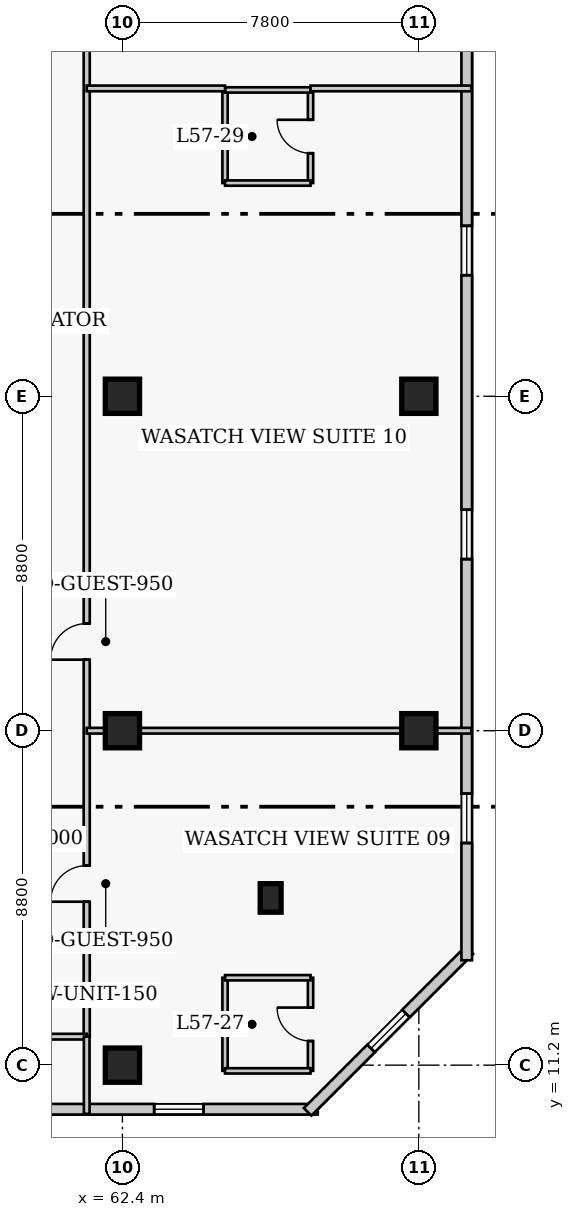
"""IFC4 building model, lengths in metres.
Left out: names, types, materials, properties, quantities, classifications, styles, units other than length and angle.
Written with IfcOpenShell. Run it as: python <this file> out.ifc"""

import sys

from ifc_helpers import new_model, si_unit, direction, frame, frame_2d, origin, origin_2d, place, context, subcontext, project, spatial, rectangle, extrude, element, fill, save


model = new_model("IFC4")
c1 = context("Model", 3, precision=1e-05, world=origin(), true_north=direction((0.0, 1.0)))
c2 = subcontext(c1, "Body", "Model", "MODEL_VIEW")
j1 = project(units=[si_unit("LENGTHUNIT", "METRE"), si_unit("PLANEANGLEUNIT", "RADIAN")], contexts=[c1])
p1 = place(None, origin())
s1 = spatial("IfcSite", under=j1, at=p1, CompositionType="ELEMENT")
p2 = place(p1, origin())
s2 = spatial("IfcBuilding", under=s1, at=p2, CompositionType="ELEMENT")
p3 = place(p2, frame((0.0, 0.0, 228.0)))
s3 = spatial("IfcBuildingStorey", under=s2, at=p3, CompositionType="ELEMENT", Elevation=228.0)
for number, where, z_axis, x_axis in (
    (1, (62.4, 11.2, 0.0), (0.0, 0.0, 1.0), (1.0, 0.0, 0.0)),
    (2, (62.4, 20.0, 0.0), (0.0, 0.0, 1.0), (1.0, 0.0, 0.0)),
    (3, (62.4, 28.8, 0.0), (0.0, 0.0, 1.0), (1.0, 0.0, 0.0)),
    (4, (70.2, 20.0, 0.0), (0.0, 0.0, 1.0), (1.0, 0.0, 0.0)),
    (5, (70.2, 28.8, 0.0), (0.0, 0.0, 1.0), (1.0, 0.0, 0.0)),
):
    element("IfcColumn", number, at=place(p3, frame(where, z_axis=z_axis, x_axis=x_axis)), inside=s3, PredefinedType="COLUMN", context=c2, shape_type="SweptSolid", body=[
        extrude(rectangle(XDim=0.9, YDim=0.9, at=origin_2d()), origin(), (0.0, 0.0, 1.0), 3.9),
    ])
p4 = place(p3, frame((66.3, 15.6, 0.0), z_axis=(0.0, 0.0, 1.0), x_axis=(1.0, 0.0, 0.0)))
e6 = element("IfcColumn", 6, at=p4, inside=s3, PredefinedType="PILASTER", context=c2, shape_type="SweptSolid", body=[
    extrude(rectangle(XDim=0.55, YDim=0.75, at=origin_2d()), origin(), (0.0, 0.0, 1.0), 3.9),
])
p5 = place(p3, frame((41.71, 10.04, 0.0), z_axis=(0.0, 0.0, 1.0), x_axis=(1.0, 0.0, 0.0)))
e7 = element("IfcWall", 7, at=p5, inside=s3, PredefinedType="SOLIDWALL", context=c2, shape_type="SweptSolid", body=[
    extrude(rectangle(XDim=25.83, YDim=0.28, at=frame_2d((12.915, 0.0))), origin(), (0.0, 0.0, 1.0), 3.56),
])
p6 = place(p5, frame((8.29, 0.0, 0.0)))
e8 = element("IfcOpeningElement", 8, at=p6, cuts=e7, PredefinedType="OPENING", context=c2, shape_type="SweptSolid", body=[
    extrude(rectangle(XDim=1.4, YDim=2.15, at=frame_2d((0.7, 1.075))), frame((0.0, 0.15, 0.0), z_axis=(0.0, -1.0, 0.0), x_axis=(1.0, 0.0, 0.0)), (0.0, 0.0, 1.0), 0.3),
])
p7 = place(p5, frame((3.005, 0.0, 0.85)))
e9 = element("IfcOpeningElement", 9, at=p7, cuts=e7, PredefinedType="OPENING", context=c2, shape_type="SweptSolid", body=[
    extrude(rectangle(XDim=1.3, YDim=1.7, at=frame_2d((0.65, 0.85))), frame((0.0, 0.15, 0.0), z_axis=(0.0, -1.0, 0.0), x_axis=(1.0, 0.0, 0.0)), (0.0, 0.0, 1.0), 0.3),
])
p8 = place(p5, frame((13.415, 0.0, 0.85)))
e10 = element("IfcOpeningElement", 10, at=p8, cuts=e7, PredefinedType="OPENING", context=c2, shape_type="SweptSolid", body=[
    extrude(rectangle(XDim=1.3, YDim=1.7, at=frame_2d((0.65, 0.85))), frame((0.0, 0.15, 0.0), z_axis=(0.0, -1.0, 0.0), x_axis=(1.0, 0.0, 0.0)), (0.0, 0.0, 1.0), 0.3),
])
p9 = place(p5, frame((21.525, 0.0, 0.85)))
e11 = element("IfcOpeningElement", 11, at=p9, cuts=e7, PredefinedType="OPENING", context=c2, shape_type="SweptSolid", body=[
    extrude(rectangle(XDim=1.3, YDim=1.7, at=frame_2d((0.65, 0.85))), frame((0.0, 0.15, 0.0), z_axis=(0.0, -1.0, 0.0), x_axis=(1.0, 0.0, 0.0)), (0.0, 0.0, 1.0), 0.3),
])
p10 = place(p3, frame((67.273, 9.971, 0.0), z_axis=(0.0, 0.0, 1.0), x_axis=(0.707106781187, 0.707106781187, 0.0)))
e12 = element("IfcWall", 12, at=p10, inside=s3, PredefinedType="SOLIDWALL", context=c2, shape_type="SweptSolid", body=[
    extrude(rectangle(XDim=6.02, YDim=0.28, at=frame_2d((3.01, 0.0))), origin(), (0.0, 0.0, 1.0), 3.56),
])
p11 = place(p10, frame((2.36, 0.0, 0.85)))
e13 = element("IfcOpeningElement", 13, at=p11, cuts=e12, PredefinedType="OPENING", context=c2, shape_type="SweptSolid", body=[
    extrude(rectangle(XDim=1.3, YDim=1.7, at=frame_2d((0.65, 0.85))), frame((0.0, 0.15, 0.0), z_axis=(0.0, -1.0, 0.0), x_axis=(1.0, 0.0, 0.0)), (0.0, 0.0, 1.0), 0.3),
])
p12 = place(p3, frame((71.46, 13.96, 0.0), z_axis=(0.0, 0.0, 1.0), x_axis=(0.0, 1.0, 0.0)))
e14 = element("IfcWall", 14, at=p12, inside=s3, PredefinedType="SOLIDWALL", context=c2, shape_type="SweptSolid", body=[
    extrude(rectangle(XDim=29.88, YDim=0.28, at=frame_2d((14.94, 0.0))), origin(), (0.0, 0.0, 1.0), 3.56),
])
p13 = place(p12, frame((3.085, 0.0, 0.85)))
e15 = element("IfcOpeningElement", 15, at=p13, cuts=e14, PredefinedType="OPENING", context=c2, shape_type="SweptSolid", body=[
    extrude(rectangle(XDim=1.3, YDim=1.7, at=frame_2d((0.65, 0.85))), frame((0.0, 0.15, 0.0), z_axis=(0.0, -1.0, 0.0), x_axis=(1.0, 0.0, 0.0)), (0.0, 0.0, 1.0), 0.3),
])
p14 = place(p12, frame((10.555, 0.0, 0.85)))
e16 = element("IfcOpeningElement", 16, at=p14, cuts=e14, PredefinedType="OPENING", context=c2, shape_type="SweptSolid", body=[
    extrude(rectangle(XDim=1.3, YDim=1.7, at=frame_2d((0.65, 0.85))), frame((0.0, 0.15, 0.0), z_axis=(0.0, -1.0, 0.0), x_axis=(1.0, 0.0, 0.0)), (0.0, 0.0, 1.0), 0.3),
])
p15 = place(p12, frame((18.025, 0.0, 0.85)))
e17 = element("IfcOpeningElement", 17, at=p15, cuts=e14, PredefinedType="OPENING", context=c2, shape_type="SweptSolid", body=[
    extrude(rectangle(XDim=1.3, YDim=1.7, at=frame_2d((0.65, 0.85))), frame((0.0, 0.15, 0.0), z_axis=(0.0, -1.0, 0.0), x_axis=(1.0, 0.0, 0.0)), (0.0, 0.0, 1.0), 0.3),
])
p16 = place(p12, frame((25.495, 0.0, 0.85)))
e18 = element("IfcOpeningElement", 18, at=p16, cuts=e14, PredefinedType="OPENING", context=c2, shape_type="SweptSolid", body=[
    extrude(rectangle(XDim=1.3, YDim=1.7, at=frame_2d((0.65, 0.85))), frame((0.0, 0.15, 0.0), z_axis=(0.0, -1.0, 0.0), x_axis=(1.0, 0.0, 0.0)), (0.0, 0.0, 1.0), 0.3),
])
p17 = place(p3, frame((61.46, 11.95, 0.0), z_axis=(0.0, 0.0, 1.0), x_axis=(0.0, 1.0, 0.0)))
e19 = element("IfcWall", 19, at=p17, inside=s3, PredefinedType="PARTITIONING", context=c2, shape_type="SweptSolid", body=[
    extrude(rectangle(XDim=28.7, YDim=0.16, at=frame_2d((14.35, 0.0))), origin(), (0.0, 0.0, 1.0), 3.56),
])
p18 = place(p17, frame((3.55, 0.0, 0.0)))
e20 = element("IfcOpeningElement", 20, at=p18, cuts=e19, PredefinedType="OPENING", context=c2, shape_type="SweptSolid", body=[
    extrude(rectangle(XDim=0.95, YDim=2.1, at=frame_2d((0.475, 1.05))), frame((0.0, 0.09, 0.0), z_axis=(0.0, -1.0, 0.0), x_axis=(1.0, 0.0, 0.0)), (0.0, 0.0, 1.0), 0.18),
])
p19 = place(p17, frame((9.919, 0.0, 0.0)))
e21 = element("IfcOpeningElement", 21, at=p19, cuts=e19, PredefinedType="OPENING", context=c2, shape_type="SweptSolid", body=[
    extrude(rectangle(XDim=0.95, YDim=2.1, at=frame_2d((0.475, 1.05))), frame((0.0, 0.09, 0.0), z_axis=(0.0, -1.0, 0.0), x_axis=(1.0, 0.0, 0.0)), (0.0, 0.0, 1.0), 0.18),
])
p20 = place(p17, frame((27.26, 0.0, 0.0)))
e22 = element("IfcOpeningElement", 22, at=p20, cuts=e19, PredefinedType="OPENING", context=c2, shape_type="SweptSolid", body=[
    extrude(rectangle(XDim=1.0, YDim=2.15, at=frame_2d((0.5, 1.075))), frame((0.0, 0.09, 0.0), z_axis=(0.0, -1.0, 0.0), x_axis=(1.0, 0.0, 0.0)), (0.0, 0.0, 1.0), 0.18),
])
p21 = place(p3, frame((59.24, 11.95, 0.0), z_axis=(0.0, 0.0, 1.0), x_axis=(1.0, 0.0, 0.0)))
e23 = element("IfcWall", 23, at=p21, inside=s3, PredefinedType="PARTITIONING", context=c2, shape_type="SweptSolid", body=[
    extrude(rectangle(XDim=2.22, YDim=0.15, at=frame_2d((1.11, 0.0))), origin(), (0.0, 0.0, 1.0), 3.56),
])
p22 = place(p3, frame((61.46, 9.92, 0.0), z_axis=(0.0, 0.0, 1.0), x_axis=(0.0, 1.0, 0.0)))
e24 = element("IfcWall", 24, at=p22, inside=s3, PredefinedType="PARTITIONING", context=c2, shape_type="SweptSolid", body=[
    extrude(rectangle(XDim=2.03, YDim=0.15, at=frame_2d((1.015, 0.0))), origin(), (0.0, 0.0, 1.0), 3.56),
])
p23 = place(p3, frame((65.1, 11.05, 0.0), z_axis=(0.0, 0.0, 1.0), x_axis=(0.0, 1.0, 0.0)))
e25 = element("IfcWall", 25, at=p23, inside=s3, PredefinedType="PLUMBINGWALL", context=c2, shape_type="SweptSolid", body=[
    extrude(rectangle(XDim=2.45, YDim=0.14, at=frame_2d((1.225, 0.0))), origin(), (0.0, 0.0, 1.0), 3.56),
])
p24 = place(p3, frame((67.35, 11.05, 0.0), z_axis=(0.0, 0.0, 1.0), x_axis=(0.0, 1.0, 0.0)))
e26 = element("IfcWall", 26, at=p24, inside=s3, PredefinedType="PLUMBINGWALL", context=c2, shape_type="SweptSolid", body=[
    extrude(rectangle(XDim=2.45, YDim=0.14, at=frame_2d((1.225, 0.0))), origin(), (0.0, 0.0, 1.0), 3.56),
])
p25 = place(p24, frame((0.785, 0.0, 0.0)))
e27 = element("IfcOpeningElement", 27, at=p25, cuts=e26, PredefinedType="OPENING", context=c2, shape_type="SweptSolid", body=[
    extrude(rectangle(XDim=0.88, YDim=2.05, at=frame_2d((0.44, 1.025))), frame((0.0, 0.08, 0.0), z_axis=(0.0, -1.0, 0.0), x_axis=(1.0, 0.0, 0.0)), (0.0, 0.0, 1.0), 0.16),
])
for number, where, z_axis, x_axis in (
    (28, (65.1, 11.05, 0.0), (0.0, 0.0, 1.0), (1.0, 0.0, 0.0)),
    (29, (65.1, 13.5, 0.0), (0.0, 0.0, 1.0), (1.0, 0.0, 0.0)),
):
    element("IfcWall", number, at=place(p3, frame(where, z_axis=z_axis, x_axis=x_axis)), inside=s3, PredefinedType="PLUMBINGWALL", context=c2, shape_type="SweptSolid", body=[
        extrude(rectangle(XDim=2.25, YDim=0.14, at=frame_2d((1.125, 0.0))), origin(), (0.0, 0.0, 1.0), 3.56),
    ])
p26 = place(p3, frame((61.46, 20.0, 0.0), z_axis=(0.0, 0.0, 1.0), x_axis=(1.0, 0.0, 0.0)))
e30 = element("IfcWall", 30, at=p26, inside=s3, PredefinedType="PARTITIONING", context=c2, shape_type="SweptSolid", body=[
    extrude(rectangle(XDim=10.12, YDim=0.15, at=frame_2d((5.06, 0.0))), origin(), (0.0, 0.0, 1.0), 2.788),
])
p27 = place(p3, frame((65.1, 34.41, 0.0), z_axis=(0.0, 0.0, 1.0), x_axis=(0.0, 1.0, 0.0)))
e31 = element("IfcWall", 31, at=p27, inside=s3, PredefinedType="PLUMBINGWALL", context=c2, shape_type="SweptSolid", body=[
    extrude(rectangle(XDim=2.45, YDim=0.14, at=frame_2d((1.225, 0.0))), origin(), (0.0, 0.0, 1.0), 3.56),
])
p28 = place(p3, frame((67.35, 34.41, 0.0), z_axis=(0.0, 0.0, 1.0), x_axis=(0.0, 1.0, 0.0)))
e32 = element("IfcWall", 32, at=p28, inside=s3, PredefinedType="PLUMBINGWALL", context=c2, shape_type="SweptSolid", body=[
    extrude(rectangle(XDim=2.45, YDim=0.14, at=frame_2d((1.225, 0.0))), origin(), (0.0, 0.0, 1.0), 3.56),
])
p29 = place(p28, frame((0.785, 0.0, 0.0)))
e33 = element("IfcOpeningElement", 33, at=p29, cuts=e32, PredefinedType="OPENING", context=c2, shape_type="SweptSolid", body=[
    extrude(rectangle(XDim=0.88, YDim=2.05, at=frame_2d((0.44, 1.025))), frame((0.0, 0.08, 0.0), z_axis=(0.0, -1.0, 0.0), x_axis=(1.0, 0.0, 0.0)), (0.0, 0.0, 1.0), 0.16),
])
for number, where, z_axis, x_axis in (
    (34, (65.1, 34.41, 0.0), (0.0, 0.0, 1.0), (1.0, 0.0, 0.0)),
    (35, (65.1, 36.86, 0.0), (0.0, 0.0, 1.0), (1.0, 0.0, 0.0)),
):
    element("IfcWall", number, at=place(p3, frame(where, z_axis=z_axis, x_axis=x_axis)), inside=s3, PredefinedType="PLUMBINGWALL", context=c2, shape_type="SweptSolid", body=[
        extrude(rectangle(XDim=2.25, YDim=0.14, at=frame_2d((1.125, 0.0))), origin(), (0.0, 0.0, 1.0), 3.56),
    ])
p30 = place(p3, frame((61.46, 36.9, 0.0), z_axis=(0.0, 0.0, 1.0), x_axis=(1.0, 0.0, 0.0)))
e36 = element("IfcWall", 36, at=p30, inside=s3, PredefinedType="PARTITIONING", context=c2, shape_type="SweptSolid", body=[
    extrude(rectangle(XDim=3.64, YDim=0.15, at=frame_2d((1.82, 0.0))), origin(), (0.0, 0.0, 1.0), 3.56),
])
p31 = place(p3, frame((67.35, 36.9, 0.0), z_axis=(0.0, 0.0, 1.0), x_axis=(1.0, 0.0, 0.0)))
e37 = element("IfcWall", 37, at=p31, inside=s3, PredefinedType="PARTITIONING", context=c2, shape_type="SweptSolid", body=[
    extrude(rectangle(XDim=4.23, YDim=0.15, at=frame_2d((2.115, 0.0))), origin(), (0.0, 0.0, 1.0), 3.56),
])
p32 = place(p9, origin())
e38 = element("IfcWindow", 38, at=p32, inside=s3, PartitioningType="SINGLE_PANEL", PredefinedType="WINDOW", context=c2, shape_type="SweptSolid", body=[
    extrude(rectangle(XDim=1.3, YDim=1.7, at=frame_2d((0.65, 0.85))), frame((0.0, 0.03, 0.0), z_axis=(0.0, -1.0, 0.0), x_axis=(1.0, 0.0, 0.0)), (0.0, 0.0, 1.0), 0.06),
])
fill(e11, e38)
p33 = place(p11, origin())
e39 = element("IfcWindow", 39, at=p33, inside=s3, PartitioningType="SINGLE_PANEL", PredefinedType="WINDOW", context=c2, shape_type="SweptSolid", body=[
    extrude(rectangle(XDim=1.3, YDim=1.7, at=frame_2d((0.65, 0.85))), frame((0.0, 0.03, 0.0), z_axis=(0.0, -1.0, 0.0), x_axis=(1.0, 0.0, 0.0)), (0.0, 0.0, 1.0), 0.06),
])
fill(e13, e39)
p34 = place(p13, origin())
e40 = element("IfcWindow", 40, at=p34, inside=s3, PartitioningType="SINGLE_PANEL", PredefinedType="WINDOW", context=c2, shape_type="SweptSolid", body=[
    extrude(rectangle(XDim=1.3, YDim=1.7, at=frame_2d((0.65, 0.85))), frame((0.0, 0.03, 0.0), z_axis=(0.0, -1.0, 0.0), x_axis=(1.0, 0.0, 0.0)), (0.0, 0.0, 1.0), 0.06),
])
fill(e15, e40)
p35 = place(p14, origin())
e41 = element("IfcWindow", 41, at=p35, inside=s3, PartitioningType="SINGLE_PANEL", PredefinedType="WINDOW", context=c2, shape_type="SweptSolid", body=[
    extrude(rectangle(XDim=1.3, YDim=1.7, at=frame_2d((0.65, 0.85))), frame((0.0, 0.03, 0.0), z_axis=(0.0, -1.0, 0.0), x_axis=(1.0, 0.0, 0.0)), (0.0, 0.0, 1.0), 0.06),
])
fill(e16, e41)
p36 = place(p15, origin())
e42 = element("IfcWindow", 42, at=p36, inside=s3, PartitioningType="SINGLE_PANEL", PredefinedType="WINDOW", context=c2, shape_type="SweptSolid", body=[
    extrude(rectangle(XDim=1.3, YDim=1.7, at=frame_2d((0.65, 0.85))), frame((0.0, 0.03, 0.0), z_axis=(0.0, -1.0, 0.0), x_axis=(1.0, 0.0, 0.0)), (0.0, 0.0, 1.0), 0.06),
])
fill(e17, e42)
p37 = place(p25, origin())
e43 = element("IfcDoor", 43, at=p37, inside=s3, OperationType="SINGLE_SWING_RIGHT", PredefinedType="DOOR", context=c2, shape_type="SweptSolid", body=[
    extrude(rectangle(XDim=0.88, YDim=2.05, at=frame_2d((0.44, 1.025))), frame((0.0, 0.025, 0.0), z_axis=(0.0, -1.0, 0.0), x_axis=(1.0, 0.0, 0.0)), (0.0, 0.0, 1.0), 0.05),
])
fill(e27, e43)
p38 = place(p18, origin())
e44 = element("IfcDoor", 44, at=p38, inside=s3, OperationType="SINGLE_SWING_LEFT", PredefinedType="DOOR", context=c2, shape_type="SweptSolid", body=[
    extrude(rectangle(XDim=0.95, YDim=2.1, at=frame_2d((0.475, 1.05))), frame((0.0, 0.025, 0.0), z_axis=(0.0, -1.0, 0.0), x_axis=(1.0, 0.0, 0.0)), (0.0, 0.0, 1.0), 0.05),
])
fill(e20, e44)
p39 = place(p29, origin())
e45 = element("IfcDoor", 45, at=p39, inside=s3, OperationType="SINGLE_SWING_RIGHT", PredefinedType="DOOR", context=c2, shape_type="SweptSolid", body=[
    extrude(rectangle(XDim=0.88, YDim=2.05, at=frame_2d((0.44, 1.025))), frame((0.0, 0.025, 0.0), z_axis=(0.0, -1.0, 0.0), x_axis=(1.0, 0.0, 0.0)), (0.0, 0.0, 1.0), 0.05),
])
fill(e33, e45)
p40 = place(p19, origin())
e46 = element("IfcDoor", 46, at=p40, inside=s3, OperationType="SINGLE_SWING_LEFT", PredefinedType="DOOR", context=c2, shape_type="SweptSolid", body=[
    extrude(rectangle(XDim=0.95, YDim=2.1, at=frame_2d((0.475, 1.05))), frame((0.0, 0.025, 0.0), z_axis=(0.0, -1.0, 0.0), x_axis=(1.0, 0.0, 0.0)), (0.0, 0.0, 1.0), 0.05),
])
fill(e21, e46)
save(model, sys.argv[1])
